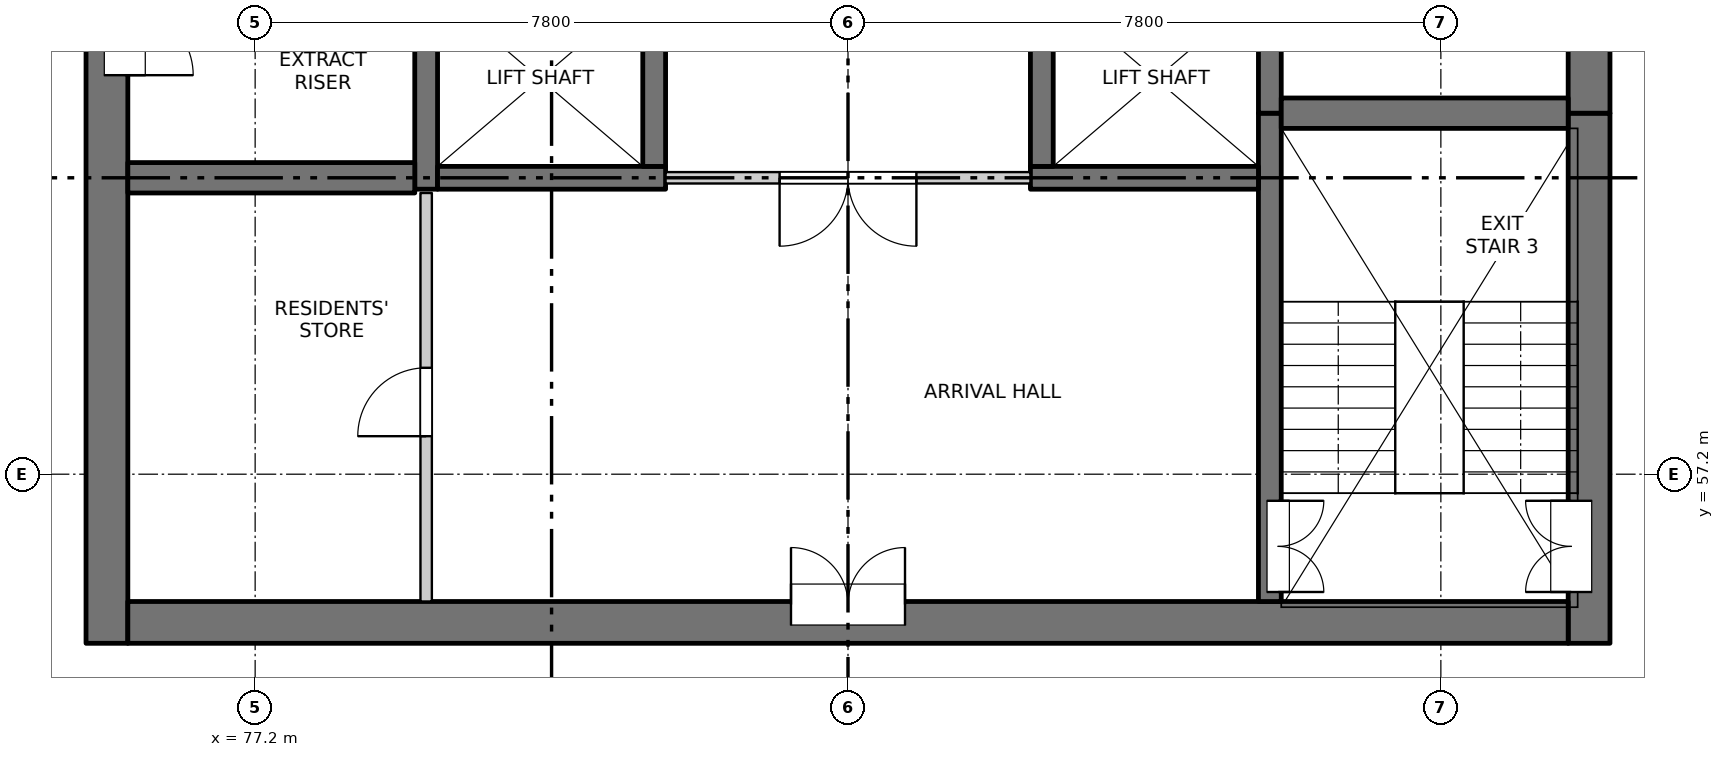
"""IFC4 building model, lengths in metres.
Left out: names, types, materials, properties, quantities, classifications, styles, units other than length and angle.
Written with IfcOpenShell. Run it as: python <this file> out.ifc"""

import sys

from ifc_helpers import new_model, si_unit, direction, frame, frame_2d, origin, place, context, subcontext, project, spatial, rectangle, extrude, element, fill, save


model = new_model("IFC4")
c1 = context("Model", 3, precision=1e-05, world=origin(), true_north=direction((0.0, 1.0)))
c2 = subcontext(c1, "Body", "Model", "MODEL_VIEW")
j1 = project(units=[si_unit("LENGTHUNIT", "METRE"), si_unit("PLANEANGLEUNIT", "RADIAN")], contexts=[c1])
p1 = place(None, origin())
s1 = spatial("IfcSite", under=j1, at=p1, CompositionType="ELEMENT")
p2 = place(p1, origin())
s2 = spatial("IfcBuilding", under=s1, at=p2, CompositionType="ELEMENT")
p3 = place(p2, frame((0.0, 0.0, 137.3)))
s3 = spatial("IfcBuildingStorey", under=s2, at=p3, CompositionType="ELEMENT", Elevation=137.3)
p4 = place(p3, frame((75.25, 54.975, -0.25), z_axis=(0.0, 0.0, 1.0), x_axis=(0.0, 1.0, 0.0)))
e1 = element("IfcWall", 1, at=p4, inside=s3, PredefinedType="SOLIDWALL", context=c2, shape_type="SweptSolid", body=[
    extrude(rectangle(XDim=22.325, YDim=0.55, at=frame_2d((11.163, 0.0))), origin(), (0.0, 0.0, 1.0), 3.4),
])
p5 = place(p4, frame((7.475, 0.0, 0.25)))
e2 = element("IfcOpeningElement", 2, at=p5, cuts=e1, PredefinedType="OPENING", context=c2, shape_type="SweptSolid", body=[
    extrude(rectangle(XDim=0.9, YDim=2.1, at=frame_2d((0.45, 1.05))), frame((0.0, 0.285, 0.0), z_axis=(0.0, -1.0, 0.0), x_axis=(1.0, 0.0, 0.0)), (0.0, 0.0, 1.0), 0.57),
])
p6 = place(p4, frame((13.775, 0.0, 0.25)))
e3 = element("IfcOpeningElement", 3, at=p6, cuts=e1, PredefinedType="OPENING", context=c2, shape_type="SweptSolid", body=[
    extrude(rectangle(XDim=0.9, YDim=2.1, at=frame_2d((0.45, 1.05))), frame((0.0, 0.285, 0.0), z_axis=(0.0, -1.0, 0.0), x_axis=(1.0, 0.0, 0.0)), (0.0, 0.0, 1.0), 0.57),
])
p7 = place(p4, frame((20.075, 0.0, 0.25)))
e4 = element("IfcOpeningElement", 4, at=p7, cuts=e1, PredefinedType="OPENING", context=c2, shape_type="SweptSolid", body=[
    extrude(rectangle(XDim=0.9, YDim=2.1, at=frame_2d((0.45, 1.05))), frame((0.0, 0.285, 0.0), z_axis=(0.0, -1.0, 0.0), x_axis=(1.0, 0.0, 0.0)), (0.0, 0.0, 1.0), 0.57),
])
p8 = place(p3, frame((94.75, 54.975, -0.25), z_axis=(0.0, 0.0, 1.0), x_axis=(0.0, 1.0, 0.0)))
e5 = element("IfcWall", 5, at=p8, inside=s3, PredefinedType="SOLIDWALL", context=c2, shape_type="SweptSolid", body=[
    extrude(rectangle(XDim=6.975, YDim=0.55, at=frame_2d((3.487, 0.0))), origin(), (0.0, 0.0, 1.0), 3.4),
])
p9 = place(p8, frame((0.675, 0.0, 0.25)))
e6 = element("IfcOpeningElement", 6, at=p9, cuts=e5, PredefinedType="OPENING", context=c2, shape_type="SweptSolid", body=[
    extrude(rectangle(XDim=1.2, YDim=2.1, at=frame_2d((0.6, 1.05))), frame((0.0, 0.285, 0.0), z_axis=(0.0, -1.0, 0.0), x_axis=(1.0, 0.0, 0.0)), (0.0, 0.0, 1.0), 0.57),
])
p10 = place(p3, frame((94.75, 61.95, -0.25), z_axis=(0.0, 0.0, 1.0), x_axis=(0.0, 1.0, 0.0)))
e7 = element("IfcWall", 7, at=p10, inside=s3, PredefinedType="SOLIDWALL", context=c2, shape_type="SweptSolid", body=[
    extrude(rectangle(XDim=15.35, YDim=0.55, at=frame_2d((7.675, 0.0))), origin(), (0.0, 0.0, 1.0), 3.4),
])
p11 = place(p10, frame((0.925, 0.0, 0.25)))
e8 = element("IfcOpeningElement", 8, at=p11, cuts=e7, PredefinedType="OPENING", context=c2, shape_type="SweptSolid", body=[
    extrude(rectangle(XDim=0.9, YDim=2.1, at=frame_2d((0.45, 1.05))), frame((0.0, 0.285, 0.0), z_axis=(0.0, -1.0, 0.0), x_axis=(1.0, 0.0, 0.0)), (0.0, 0.0, 1.0), 0.57),
])
p12 = place(p10, frame((5.15, 0.0, 0.25)))
e9 = element("IfcOpeningElement", 9, at=p12, cuts=e7, PredefinedType="OPENING", context=c2, shape_type="SweptSolid", body=[
    extrude(rectangle(XDim=0.9, YDim=2.1, at=frame_2d((0.45, 1.05))), frame((0.0, 0.285, 0.0), z_axis=(0.0, -1.0, 0.0), x_axis=(1.0, 0.0, 0.0)), (0.0, 0.0, 1.0), 0.57),
])
p13 = place(p10, frame((9.65, 0.0, 0.25)))
e10 = element("IfcOpeningElement", 10, at=p13, cuts=e7, PredefinedType="OPENING", context=c2, shape_type="SweptSolid", body=[
    extrude(rectangle(XDim=0.9, YDim=2.1, at=frame_2d((0.45, 1.05))), frame((0.0, 0.285, 0.0), z_axis=(0.0, -1.0, 0.0), x_axis=(1.0, 0.0, 0.0)), (0.0, 0.0, 1.0), 0.57),
])
p14 = place(p10, frame((13.1, 0.0, 0.25)))
e11 = element("IfcOpeningElement", 11, at=p14, cuts=e7, PredefinedType="OPENING", context=c2, shape_type="SweptSolid", body=[
    extrude(rectangle(XDim=0.9, YDim=2.1, at=frame_2d((0.45, 1.05))), frame((0.0, 0.285, 0.0), z_axis=(0.0, -1.0, 0.0), x_axis=(1.0, 0.0, 0.0)), (0.0, 0.0, 1.0), 0.57),
])
p15 = place(p3, frame((75.525, 55.25, -0.25), z_axis=(0.0, 0.0, 1.0), x_axis=(1.0, 0.0, 0.0)))
e12 = element("IfcWall", 12, at=p15, inside=s3, PredefinedType="SOLIDWALL", context=c2, shape_type="SweptSolid", body=[
    extrude(rectangle(XDim=18.95, YDim=0.55, at=frame_2d((9.475, 0.0))), origin(), (0.0, 0.0, 1.0), 3.4),
])
p16 = place(p15, frame((8.725, 0.0, 0.25)))
e13 = element("IfcOpeningElement", 13, at=p16, cuts=e12, PredefinedType="OPENING", context=c2, shape_type="SweptSolid", body=[
    extrude(rectangle(XDim=1.5, YDim=2.1, at=frame_2d((0.75, 1.05))), frame((0.0, 0.285, 0.0), z_axis=(0.0, -1.0, 0.0), x_axis=(1.0, 0.0, 0.0)), (0.0, 0.0, 1.0), 0.57),
])
p17 = place(p3, frame((79.45, 60.95, -0.25), z_axis=(0.0, 0.0, 1.0), x_axis=(0.0, 1.0, 0.0)))
e14 = element("IfcWall", 14, at=p17, inside=s3, PredefinedType="SOLIDWALL", context=c2, shape_type="SweptSolid", body=[
    extrude(rectangle(XDim=16.35, YDim=0.3, at=frame_2d((8.175, 0.0))), origin(), (0.0, 0.0, 1.0), 3.4),
])
p18 = place(p3, frame((90.55, 55.525, -0.25), z_axis=(0.0, 0.0, 1.0), x_axis=(0.0, 1.0, 0.0)))
e15 = element("IfcWall", 15, at=p18, inside=s3, PredefinedType="SOLIDWALL", context=c2, shape_type="SweptSolid", body=[
    extrude(rectangle(XDim=6.425, YDim=0.3, at=frame_2d((3.212, 0.0))), origin(), (0.0, 0.0, 1.0), 3.4),
])
p19 = place(p18, frame((0.125, 0.0, 0.25)))
e16 = element("IfcOpeningElement", 16, at=p19, cuts=e15, PredefinedType="OPENING", context=c2, shape_type="SweptSolid", body=[
    extrude(rectangle(XDim=1.2, YDim=2.1, at=frame_2d((0.6, 1.05))), frame((0.0, 0.16, 0.0), z_axis=(0.0, -1.0, 0.0), x_axis=(1.0, 0.0, 0.0)), (0.0, 0.0, 1.0), 0.32),
])
p20 = place(p3, frame((90.55, 61.95, -0.25), z_axis=(0.0, 0.0, 1.0), x_axis=(0.0, 1.0, 0.0)))
e17 = element("IfcWall", 17, at=p20, inside=s3, PredefinedType="SOLIDWALL", context=c2, shape_type="SweptSolid", body=[
    extrude(rectangle(XDim=15.35, YDim=0.3, at=frame_2d((7.675, 0.0))), origin(), (0.0, 0.0, 1.0), 3.4),
])
p21 = place(p3, frame((79.6, 61.1, -0.25), z_axis=(0.0, 0.0, 1.0), x_axis=(1.0, 0.0, 0.0)))
e18 = element("IfcWall", 18, at=p21, inside=s3, PredefinedType="SOLIDWALL", context=c2, shape_type="SweptSolid", body=[
    extrude(rectangle(XDim=3.0, YDim=0.3, at=frame_2d((1.5, 0.0))), origin(), (0.0, 0.0, 1.0), 3.4),
])
p22 = place(p3, frame((82.45, 61.25, -0.25), z_axis=(0.0, 0.0, 1.0), x_axis=(0.0, 1.0, 0.0)))
e19 = element("IfcWall", 19, at=p22, inside=s3, PredefinedType="SOLIDWALL", context=c2, shape_type="SweptSolid", body=[
    extrude(rectangle(XDim=2.3, YDim=0.3, at=frame_2d((1.15, 0.0))), origin(), (0.0, 0.0, 1.0), 3.4),
])
p23 = place(p3, frame((87.4, 61.1, -0.25), z_axis=(0.0, 0.0, 1.0), x_axis=(1.0, 0.0, 0.0)))
e20 = element("IfcWall", 20, at=p23, inside=s3, PredefinedType="SOLIDWALL", context=c2, shape_type="SweptSolid", body=[
    extrude(rectangle(XDim=3.0, YDim=0.3, at=frame_2d((1.5, 0.0))), origin(), (0.0, 0.0, 1.0), 3.4),
])
p24 = place(p3, frame((87.55, 61.25, -0.25), z_axis=(0.0, 0.0, 1.0), x_axis=(0.0, 1.0, 0.0)))
e21 = element("IfcWall", 21, at=p24, inside=s3, PredefinedType="SOLIDWALL", context=c2, shape_type="SweptSolid", body=[
    extrude(rectangle(XDim=2.3, YDim=0.3, at=frame_2d((1.15, 0.0))), origin(), (0.0, 0.0, 1.0), 3.4),
])
for number, where, z_axis, x_axis in (
    (22, (75.525, 61.1, -0.25), (0.0, 0.0, 1.0), (1.0, 0.0, 0.0)),
    (23, (90.7, 61.95, -0.25), (0.0, 0.0, 1.0), (1.0, 0.0, 0.0)),
):
    element("IfcWall", number, at=place(p3, frame(where, z_axis=z_axis, x_axis=x_axis)), inside=s3, PredefinedType="SOLIDWALL", context=c2, shape_type="SweptSolid", body=[
        extrude(rectangle(XDim=3.775, YDim=0.4, at=frame_2d((1.888, 0.0))), origin(), (0.0, 0.0, 1.0), 3.4),
    ])
p25 = place(p3, frame((82.6, 61.1, 0.0), z_axis=(0.0, 0.0, 1.0), x_axis=(1.0, 0.0, 0.0)))
e24 = element("IfcWall", 24, at=p25, inside=s3, PredefinedType="PARTITIONING", context=c2, shape_type="SweptSolid", body=[
    extrude(rectangle(XDim=4.8, YDim=0.15, at=frame_2d((2.4, 0.0))), origin(), (0.0, 0.0, 1.0), 3.15),
])
p26 = place(p25, frame((1.5, 0.0, 0.0)))
e25 = element("IfcOpeningElement", 25, at=p26, cuts=e24, PredefinedType="OPENING", context=c2, shape_type="SweptSolid", body=[
    extrude(rectangle(XDim=1.8, YDim=2.1, at=frame_2d((0.9, 1.05))), frame((0.0, 0.085, 0.0), z_axis=(0.0, -1.0, 0.0), x_axis=(1.0, 0.0, 0.0)), (0.0, 0.0, 1.0), 0.17),
])
p27 = place(p3, frame((79.45, 55.525, 0.0), z_axis=(0.0, 0.0, 1.0), x_axis=(0.0, 1.0, 0.0)))
e26 = element("IfcWall", 26, at=p27, inside=s3, PredefinedType="PARTITIONING", context=c2, shape_type="SweptSolid", body=[
    extrude(rectangle(XDim=5.375, YDim=0.15, at=frame_2d((2.688, 0.0))), origin(), (0.0, 0.0, 1.0), 3.15),
])
p28 = place(p27, frame((2.175, 0.0, 0.0)))
e27 = element("IfcOpeningElement", 27, at=p28, cuts=e26, PredefinedType="OPENING", context=c2, shape_type="SweptSolid", body=[
    extrude(rectangle(XDim=0.9, YDim=2.1, at=frame_2d((0.45, 1.05))), frame((0.0, 0.085, 0.0), z_axis=(0.0, -1.0, 0.0), x_axis=(1.0, 0.0, 0.0)), (0.0, 0.0, 1.0), 0.17),
])
p29 = place(p16, origin())
e28 = element("IfcDoor", 28, at=p29, inside=s3, OperationType="DOUBLE_DOOR_SINGLE_SWING", PredefinedType="DOOR", context=c2, shape_type="SweptSolid", body=[
    extrude(rectangle(XDim=1.5, YDim=2.1, at=frame_2d((0.75, 1.05))), frame((0.0, 0.26, 0.0), z_axis=(0.0, -1.0, 0.0), x_axis=(1.0, 0.0, 0.0)), (0.0, 0.0, 1.0), 0.05),
])
fill(e13, e28)
p30 = place(p19, origin())
e29 = element("IfcDoor", 29, at=p30, inside=s3, OperationType="DOUBLE_DOOR_SINGLE_SWING", PredefinedType="DOOR", context=c2, shape_type="SweptSolid", body=[
    extrude(rectangle(XDim=1.2, YDim=2.1, at=frame_2d((0.6, 1.05))), frame((0.0, -0.085, 0.0), z_axis=(0.0, -1.0, 0.0), x_axis=(1.0, 0.0, 0.0)), (0.0, 0.0, 1.0), 0.05),
])
fill(e16, e29)
p31 = place(p9, origin())
e30 = element("IfcDoor", 30, at=p31, inside=s3, OperationType="DOUBLE_DOOR_SINGLE_SWING", PredefinedType="DOOR", context=c2, shape_type="SweptSolid", body=[
    extrude(rectangle(XDim=1.2, YDim=2.1, at=frame_2d((0.6, 1.05))), frame((0.0, 0.26, 0.0), z_axis=(0.0, -1.0, 0.0), x_axis=(1.0, 0.0, 0.0)), (0.0, 0.0, 1.0), 0.05),
])
fill(e6, e30)
p32 = place(p28, origin())
e31 = element("IfcDoor", 31, at=p32, inside=s3, OperationType="SINGLE_SWING_LEFT", PredefinedType="DOOR", context=c2, shape_type="SweptSolid", body=[
    extrude(rectangle(XDim=0.9, YDim=2.1, at=frame_2d((0.45, 1.05))), frame((0.0, 0.025, 0.0), z_axis=(0.0, -1.0, 0.0), x_axis=(1.0, 0.0, 0.0)), (0.0, 0.0, 1.0), 0.05),
])
fill(e27, e31)
p33 = place(p26, origin())
e32 = element("IfcDoor", 32, at=p33, inside=s3, OperationType="DOUBLE_DOOR_SINGLE_SWING", PredefinedType="DOOR", context=c2, shape_type="SweptSolid", body=[
    extrude(rectangle(XDim=1.8, YDim=2.1, at=frame_2d((0.9, 1.05))), frame((0.0, 0.025, 0.0), z_axis=(0.0, -1.0, 0.0), x_axis=(1.0, 0.0, 0.0)), (0.0, 0.0, 1.0), 0.05),
])
fill(e25, e32)
p34 = place(p5, origin())
e33 = element("IfcDoor", 33, at=p34, inside=s3, OperationType="SINGLE_SWING_RIGHT", PredefinedType="DOOR", context=c2, shape_type="SweptSolid", body=[
    extrude(rectangle(XDim=0.9, YDim=2.1, at=frame_2d((0.45, 1.05))), frame((0.0, -0.21, 0.0), z_axis=(0.0, -1.0, 0.0), x_axis=(1.0, 0.0, 0.0)), (0.0, 0.0, 1.0), 0.05),
])
fill(e2, e33)
save(model, sys.argv[1])
